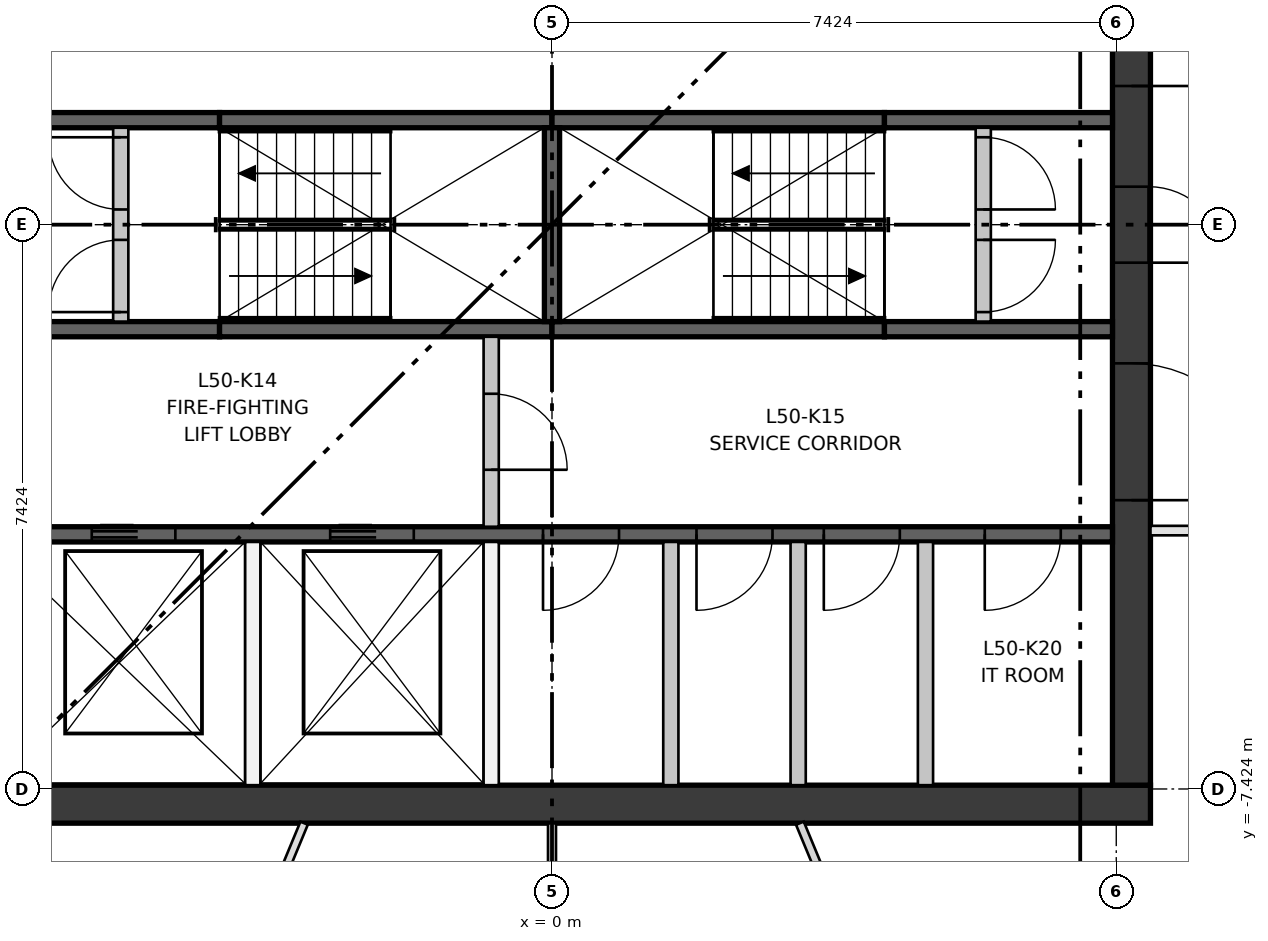
"""IFC4 building model, lengths in metres.
Left out: names, types, materials, properties, quantities, classifications, styles, units other than length and angle.
Written with IfcOpenShell. Run it as: python <this file> out.ifc"""

import sys

from ifc_helpers import new_model, si_unit, direction, frame, frame_2d, origin, place, context, subcontext, project, spatial, rectangle, extrude, element, fill, save


model = new_model("IFC4")
c1 = context("Model", 3, precision=1e-05, world=origin(), true_north=direction((0.0, 1.0)))
c2 = subcontext(c1, "Body", "Model", "MODEL_VIEW")
j1 = project(units=[si_unit("LENGTHUNIT", "METRE"), si_unit("PLANEANGLEUNIT", "RADIAN")], contexts=[c1])
p1 = place(None, origin())
s1 = spatial("IfcSite", under=j1, at=p1, CompositionType="ELEMENT")
p2 = place(p1, origin())
s2 = spatial("IfcBuilding", under=s1, at=p2, CompositionType="ELEMENT")
p3 = place(p2, frame((0.0, 0.0, 187.65)))
s3 = spatial("IfcBuildingStorey", under=s2, at=p3, CompositionType="ELEMENT", Elevation=187.65)
p4 = place(p3, frame((-7.874, -7.624, 0.0), z_axis=(0.0, 0.0, 1.0), x_axis=(1.0, 0.0, 0.0)))
e1 = element("IfcWall", 1, at=p4, inside=s3, PredefinedType="SHEAR", context=c2, shape_type="SweptSolid", body=[
    extrude(rectangle(XDim=15.748, YDim=0.5, at=frame_2d((7.874, 0.0))), origin(), (0.0, 0.0, 1.0), 3.35),
])
p5 = place(p3, frame((7.624, -7.374, 0.0), z_axis=(0.0, 0.0, 1.0), x_axis=(0.0, 1.0, 0.0)))
e2 = element("IfcWall", 2, at=p5, inside=s3, PredefinedType="SHEAR", context=c2, shape_type="SweptSolid", body=[
    extrude(rectangle(XDim=14.748, YDim=0.5, at=frame_2d((7.374, 0.0))), origin(), (0.0, 0.0, 1.0), 3.35),
])
p6 = place(p5, frame((6.874, 0.0, 0.0)))
e3 = element("IfcOpeningElement", 3, at=p6, cuts=e2, PredefinedType="OPENING", context=c2, shape_type="SweptSolid", body=[
    extrude(rectangle(XDim=1.0, YDim=2.1, at=frame_2d((0.5, 1.05))), frame((0.0, 0.26, 0.0), z_axis=(0.0, -1.0, 0.0), x_axis=(1.0, 0.0, 0.0)), (0.0, 0.0, 1.0), 0.52),
])
p7 = place(p5, frame((3.75, 0.0, 0.0)))
e4 = element("IfcOpeningElement", 4, at=p7, cuts=e2, PredefinedType="OPENING", context=c2, shape_type="SweptSolid", body=[
    extrude(rectangle(XDim=1.8, YDim=2.1, at=frame_2d((0.9, 1.05))), frame((0.0, 0.26, 0.0), z_axis=(0.0, -1.0, 0.0), x_axis=(1.0, 0.0, 0.0)), (0.0, 0.0, 1.0), 0.52),
])
p8 = place(p5, frame((9.198, 0.0, 0.0)))
e5 = element("IfcOpeningElement", 5, at=p8, cuts=e2, PredefinedType="OPENING", context=c2, shape_type="SweptSolid", body=[
    extrude(rectangle(XDim=1.8, YDim=2.1, at=frame_2d((0.9, 1.05))), frame((0.0, 0.26, 0.0), z_axis=(0.0, -1.0, 0.0), x_axis=(1.0, 0.0, 0.0)), (0.0, 0.0, 1.0), 0.52),
])
p9 = place(p3, frame((-7.374, -4.074, 0.0), z_axis=(0.0, 0.0, 1.0), x_axis=(1.0, 0.0, 0.0)))
e6 = element("IfcWall", 6, at=p9, inside=s3, PredefinedType="SHEAR", context=c2, shape_type="SweptSolid", body=[
    extrude(rectangle(XDim=14.748, YDim=0.2, at=frame_2d((7.374, 0.0))), origin(), (0.0, 0.0, 1.0), 3.0),
])
p10 = place(p9, frame((1.319, 0.0, 0.0)))
e7 = element("IfcOpeningElement", 7, at=p10, cuts=e6, PredefinedType="OPENING", context=c2, shape_type="SweptSolid", body=[
    extrude(rectangle(XDim=1.1, YDim=2.1, at=frame_2d((0.55, 1.05))), frame((0.0, 0.11, 0.0), z_axis=(0.0, -1.0, 0.0), x_axis=(1.0, 0.0, 0.0)), (0.0, 0.0, 1.0), 0.22),
])
p11 = place(p9, frame((4.456, 0.0, 0.0)))
e8 = element("IfcOpeningElement", 8, at=p11, cuts=e6, PredefinedType="OPENING", context=c2, shape_type="SweptSolid", body=[
    extrude(rectangle(XDim=1.1, YDim=2.1, at=frame_2d((0.55, 1.05))), frame((0.0, 0.11, 0.0), z_axis=(0.0, -1.0, 0.0), x_axis=(1.0, 0.0, 0.0)), (0.0, 0.0, 1.0), 0.22),
])
p12 = place(p9, frame((7.256, 0.0, 0.0)))
e9 = element("IfcOpeningElement", 9, at=p12, cuts=e6, PredefinedType="OPENING", context=c2, shape_type="SweptSolid", body=[
    extrude(rectangle(XDim=1.0, YDim=2.1, at=frame_2d((0.5, 1.05))), frame((0.0, 0.11, 0.0), z_axis=(0.0, -1.0, 0.0), x_axis=(1.0, 0.0, 0.0)), (0.0, 0.0, 1.0), 0.22),
])
p13 = place(p9, frame((9.275, 0.0, 0.0)))
e10 = element("IfcOpeningElement", 10, at=p13, cuts=e6, PredefinedType="OPENING", context=c2, shape_type="SweptSolid", body=[
    extrude(rectangle(XDim=1.0, YDim=2.1, at=frame_2d((0.5, 1.05))), frame((0.0, 0.11, 0.0), z_axis=(0.0, -1.0, 0.0), x_axis=(1.0, 0.0, 0.0)), (0.0, 0.0, 1.0), 0.22),
])
p14 = place(p9, frame((10.95, 0.0, 0.0)))
e11 = element("IfcOpeningElement", 11, at=p14, cuts=e6, PredefinedType="OPENING", context=c2, shape_type="SweptSolid", body=[
    extrude(rectangle(XDim=1.0, YDim=2.1, at=frame_2d((0.5, 1.05))), frame((0.0, 0.11, 0.0), z_axis=(0.0, -1.0, 0.0), x_axis=(1.0, 0.0, 0.0)), (0.0, 0.0, 1.0), 0.22),
])
p15 = place(p9, frame((13.068, 0.0, 0.0)))
e12 = element("IfcOpeningElement", 12, at=p15, cuts=e6, PredefinedType="OPENING", context=c2, shape_type="SweptSolid", body=[
    extrude(rectangle(XDim=1.0, YDim=2.1, at=frame_2d((0.5, 1.05))), frame((0.0, 0.11, 0.0), z_axis=(0.0, -1.0, 0.0), x_axis=(1.0, 0.0, 0.0)), (0.0, 0.0, 1.0), 0.22),
])
p16 = place(p3, frame((-7.374, -1.375, 0.0), z_axis=(0.0, 0.0, 1.0), x_axis=(1.0, 0.0, 0.0)))
e13 = element("IfcWall", 13, at=p16, inside=s3, PredefinedType="SHEAR", context=c2, shape_type="SweptSolid", body=[
    extrude(rectangle(XDim=3.0, YDim=0.2, at=frame_2d((1.5, 0.0))), origin(), (0.0, 0.0, 1.0), 3.0),
])
for number, where, z_axis, x_axis in (
    (14, (-4.374, -1.375, 0.0), (0.0, 0.0, 1.0), (1.0, 0.0, 0.0)),
    (15, (0.0, -1.375, 0.0), (0.0, 0.0, 1.0), (1.0, 0.0, 0.0)),
):
    element("IfcWall", number, at=place(p3, frame(where, z_axis=z_axis, x_axis=x_axis)), inside=s3, PredefinedType="SHEAR", context=c2, shape_type="SweptSolid", body=[
        extrude(rectangle(XDim=4.374, YDim=0.2, at=frame_2d((2.187, 0.0))), origin(), (0.0, 0.0, 1.0), 3.0),
    ])
for number, where, z_axis, x_axis in (
    (16, (4.374, -1.375, 0.0), (0.0, 0.0, 1.0), (1.0, 0.0, 0.0)),
    (17, (-7.374, 1.375, 0.0), (0.0, 0.0, 1.0), (1.0, 0.0, 0.0)),
):
    element("IfcWall", number, at=place(p3, frame(where, z_axis=z_axis, x_axis=x_axis)), inside=s3, PredefinedType="SHEAR", context=c2, shape_type="SweptSolid", body=[
        extrude(rectangle(XDim=3.0, YDim=0.2, at=frame_2d((1.5, 0.0))), origin(), (0.0, 0.0, 1.0), 3.0),
    ])
for number, where, z_axis, x_axis in (
    (18, (-4.374, 1.375, 0.0), (0.0, 0.0, 1.0), (1.0, 0.0, 0.0)),
    (19, (0.0, 1.375, 0.0), (0.0, 0.0, 1.0), (1.0, 0.0, 0.0)),
):
    element("IfcWall", number, at=place(p3, frame(where, z_axis=z_axis, x_axis=x_axis)), inside=s3, PredefinedType="SHEAR", context=c2, shape_type="SweptSolid", body=[
        extrude(rectangle(XDim=4.374, YDim=0.2, at=frame_2d((2.187, 0.0))), origin(), (0.0, 0.0, 1.0), 3.0),
    ])
p17 = place(p3, frame((4.374, 1.375, 0.0), z_axis=(0.0, 0.0, 1.0), x_axis=(1.0, 0.0, 0.0)))
e20 = element("IfcWall", 20, at=p17, inside=s3, PredefinedType="SHEAR", context=c2, shape_type="SweptSolid", body=[
    extrude(rectangle(XDim=3.0, YDim=0.2, at=frame_2d((1.5, 0.0))), origin(), (0.0, 0.0, 1.0), 3.0),
])
p18 = place(p3, frame((0.0, -1.275, 0.0), z_axis=(0.0, 0.0, 1.0), x_axis=(0.0, 1.0, 0.0)))
e21 = element("IfcWall", 21, at=p18, inside=s3, PredefinedType="SHEAR", context=c2, shape_type="SweptSolid", body=[
    extrude(rectangle(XDim=2.55, YDim=0.2, at=frame_2d((1.275, 0.0))), origin(), (0.0, 0.0, 1.0), 3.0),
])
for number, where, z_axis, x_axis in (
    (22, (-3.937, -7.374, 0.0), (0.0, 0.0, 1.0), (0.0, 1.0, 0.0)),
    (23, (-0.8, -7.374, 0.0), (0.0, 0.0, 1.0), (0.0, 1.0, 0.0)),
):
    element("IfcWall", number, at=place(p3, frame(where, z_axis=z_axis, x_axis=x_axis)), inside=s3, PredefinedType="PARTITIONING", context=c2, shape_type="SweptSolid", body=[
        extrude(rectangle(XDim=3.2, YDim=0.2, at=frame_2d((1.6, 0.0))), origin(), (0.0, 0.0, 1.0), 3.0),
    ])
p19 = place(p3, frame((-0.8, -3.974, 0.0), z_axis=(0.0, 0.0, 1.0), x_axis=(0.0, 1.0, 0.0)))
e24 = element("IfcWall", 24, at=p19, inside=s3, PredefinedType="PARTITIONING", context=c2, shape_type="SweptSolid", body=[
    extrude(rectangle(XDim=2.499, YDim=0.2, at=frame_2d((1.25, 0.0))), origin(), (0.0, 0.0, 1.0), 3.0),
])
p20 = place(p19, frame((0.75, 0.0, 0.0)))
e25 = element("IfcOpeningElement", 25, at=p20, cuts=e24, PredefinedType="OPENING", context=c2, shape_type="SweptSolid", body=[
    extrude(rectangle(XDim=1.0, YDim=2.1, at=frame_2d((0.5, 1.05))), frame((0.0, 0.11, 0.0), z_axis=(0.0, -1.0, 0.0), x_axis=(1.0, 0.0, 0.0)), (0.0, 0.0, 1.0), 0.22),
])
for number, where, z_axis, x_axis in (
    (26, (1.563, -7.374, 0.0), (0.0, 0.0, 1.0), (0.0, 1.0, 0.0)),
    (27, (3.239, -7.374, 0.0), (0.0, 0.0, 1.0), (0.0, 1.0, 0.0)),
    (28, (4.914, -7.374, 0.0), (0.0, 0.0, 1.0), (0.0, 1.0, 0.0)),
):
    element("IfcWall", number, at=place(p3, frame(where, z_axis=z_axis, x_axis=x_axis)), inside=s3, PredefinedType="PARTITIONING", context=c2, shape_type="SweptSolid", body=[
        extrude(rectangle(XDim=3.2, YDim=0.2, at=frame_2d((1.6, 0.0))), origin(), (0.0, 0.0, 1.0), 3.0),
    ])
p21 = place(p3, frame((-5.674, -1.275, 0.0), z_axis=(0.0, 0.0, 1.0), x_axis=(0.0, 1.0, 0.0)))
e29 = element("IfcWall", 29, at=p21, inside=s3, PredefinedType="PARTITIONING", context=c2, shape_type="SweptSolid", body=[
    extrude(rectangle(XDim=2.55, YDim=0.2, at=frame_2d((1.275, 0.0))), origin(), (0.0, 0.0, 1.0), 3.0),
])
p22 = place(p21, frame((0.125, 0.0, 0.0)))
e30 = element("IfcOpeningElement", 30, at=p22, cuts=e29, PredefinedType="OPENING", context=c2, shape_type="SweptSolid", body=[
    extrude(rectangle(XDim=0.95, YDim=2.1, at=frame_2d((0.475, 1.05))), frame((0.0, 0.11, 0.0), z_axis=(0.0, -1.0, 0.0), x_axis=(1.0, 0.0, 0.0)), (0.0, 0.0, 1.0), 0.22),
])
p23 = place(p21, frame((1.475, 0.0, 0.0)))
e31 = element("IfcOpeningElement", 31, at=p23, cuts=e29, PredefinedType="OPENING", context=c2, shape_type="SweptSolid", body=[
    extrude(rectangle(XDim=0.95, YDim=2.1, at=frame_2d((0.475, 1.05))), frame((0.0, 0.11, 0.0), z_axis=(0.0, -1.0, 0.0), x_axis=(1.0, 0.0, 0.0)), (0.0, 0.0, 1.0), 0.22),
])
p24 = place(p3, frame((5.674, -1.275, 0.0), z_axis=(0.0, 0.0, 1.0), x_axis=(0.0, 1.0, 0.0)))
e32 = element("IfcWall", 32, at=p24, inside=s3, PredefinedType="PARTITIONING", context=c2, shape_type="SweptSolid", body=[
    extrude(rectangle(XDim=2.55, YDim=0.2, at=frame_2d((1.275, 0.0))), origin(), (0.0, 0.0, 1.0), 3.0),
])
p25 = place(p24, frame((0.125, 0.0, 0.0)))
e33 = element("IfcOpeningElement", 33, at=p25, cuts=e32, PredefinedType="OPENING", context=c2, shape_type="SweptSolid", body=[
    extrude(rectangle(XDim=0.95, YDim=2.1, at=frame_2d((0.475, 1.05))), frame((0.0, 0.11, 0.0), z_axis=(0.0, -1.0, 0.0), x_axis=(1.0, 0.0, 0.0)), (0.0, 0.0, 1.0), 0.22),
])
p26 = place(p24, frame((1.475, 0.0, 0.0)))
e34 = element("IfcOpeningElement", 34, at=p26, cuts=e32, PredefinedType="OPENING", context=c2, shape_type="SweptSolid", body=[
    extrude(rectangle(XDim=0.95, YDim=2.1, at=frame_2d((0.475, 1.05))), frame((0.0, 0.11, 0.0), z_axis=(0.0, -1.0, 0.0), x_axis=(1.0, 0.0, 0.0)), (0.0, 0.0, 1.0), 0.22),
])
p27 = place(p3, frame((11.824, -4.024, 0.0), z_axis=(0.0, 0.0, 1.0), x_axis=(-1.0, 0.0, 0.0)))
e35 = element("IfcWall", 35, at=p27, inside=s3, PredefinedType="PARTITIONING", context=c2, shape_type="SweptSolid", body=[
    extrude(rectangle(XDim=3.95, YDim=0.125, at=frame_2d((1.975, 0.0))), origin(), (0.0, 0.0, 1.0), 3.0),
])
p28 = place(p27, frame((1.1, 0.0, 0.0)))
e36 = element("IfcOpeningElement", 36, at=p28, cuts=e35, PredefinedType="OPENING", context=c2, shape_type="SweptSolid", body=[
    extrude(rectangle(XDim=1.8, YDim=2.1, at=frame_2d((0.9, 1.05))), frame((0.0, 0.073, 0.0), z_axis=(0.0, -1.0, 0.0), x_axis=(1.0, 0.0, 0.0)), (0.0, 0.0, 1.0), 0.145),
])
p29 = place(p3, frame((-3.261, -7.874, 0.0), z_axis=(0.0, 0.0, 1.0), x_axis=(-0.382666229821, -0.923886657851, 0.0)))
e37 = element("IfcWall", 37, at=p29, inside=s3, PredefinedType="PARTITIONING", context=c2, shape_type="SweptSolid", body=[
    extrude(rectangle(XDim=3.977, YDim=0.105, at=frame_2d((1.989, 0.0))), origin(), (0.0, 0.0, 1.0), 3.0),
])
p30 = place(p29, frame((1.5, 0.0, 0.0)))
e38 = element("IfcOpeningElement", 38, at=p30, cuts=e37, PredefinedType="OPENING", context=c2, shape_type="SweptSolid", body=[
    extrude(rectangle(XDim=1.0, YDim=2.1, at=frame_2d((0.5, 1.05))), frame((0.0, 0.062, 0.0), z_axis=(0.0, -1.0, 0.0), x_axis=(1.0, 0.0, 0.0)), (0.0, 0.0, 1.0), 0.125),
])
p31 = place(p3, frame((0.0, -7.874, 0.0), z_axis=(0.0, 0.0, 1.0), x_axis=(0.0, -1.0, 0.0)))
e39 = element("IfcWall", 39, at=p31, inside=s3, PredefinedType="PARTITIONING", context=c2, shape_type="SweptSolid", body=[
    extrude(rectangle(XDim=4.57, YDim=0.105, at=frame_2d((2.285, 0.0))), origin(), (0.0, 0.0, 1.0), 3.0),
])
p32 = place(p3, frame((3.261, -7.874, 0.0), z_axis=(0.0, 0.0, 1.0), x_axis=(0.382666229821, -0.923886657851, 0.0)))
e40 = element("IfcWall", 40, at=p32, inside=s3, PredefinedType="PARTITIONING", context=c2, shape_type="SweptSolid", body=[
    extrude(rectangle(XDim=3.977, YDim=0.11, at=frame_2d((1.989, 0.0))), origin(), (0.0, 0.0, 1.0), 3.0),
])
p33 = place(p10, origin())
e41 = element("IfcDoor", 41, at=p33, inside=s3, OperationType="DOUBLE_DOOR_SLIDING", PredefinedType="DOOR", context=c2, shape_type="SweptSolid", body=[
    extrude(rectangle(XDim=1.1, YDim=2.1, at=frame_2d((0.55, 1.05))), frame((0.0, 0.025, 0.0), z_axis=(0.0, -1.0, 0.0), x_axis=(1.0, 0.0, 0.0)), (0.0, 0.0, 1.0), 0.05),
])
fill(e7, e41)
p34 = place(p11, origin())
e42 = element("IfcDoor", 42, at=p34, inside=s3, OperationType="DOUBLE_DOOR_SLIDING", PredefinedType="DOOR", context=c2, shape_type="SweptSolid", body=[
    extrude(rectangle(XDim=1.1, YDim=2.1, at=frame_2d((0.55, 1.05))), frame((0.0, 0.025, 0.0), z_axis=(0.0, -1.0, 0.0), x_axis=(1.0, 0.0, 0.0)), (0.0, 0.0, 1.0), 0.05),
])
fill(e8, e42)
p35 = place(p22, origin())
e43 = element("IfcDoor", 43, at=p35, inside=s3, OperationType="SINGLE_SWING_LEFT", PredefinedType="DOOR", context=c2, shape_type="SweptSolid", body=[
    extrude(rectangle(XDim=0.95, YDim=2.1, at=frame_2d((0.475, 1.05))), frame((0.0, 0.025, 0.0), z_axis=(0.0, -1.0, 0.0), x_axis=(1.0, 0.0, 0.0)), (0.0, 0.0, 1.0), 0.05),
])
fill(e30, e43)
p36 = place(p23, origin())
e44 = element("IfcDoor", 44, at=p36, inside=s3, OperationType="SINGLE_SWING_RIGHT", PredefinedType="DOOR", context=c2, shape_type="SweptSolid", body=[
    extrude(rectangle(XDim=0.95, YDim=2.1, at=frame_2d((0.475, 1.05))), frame((0.0, 0.025, 0.0), z_axis=(0.0, -1.0, 0.0), x_axis=(1.0, 0.0, 0.0)), (0.0, 0.0, 1.0), 0.05),
])
fill(e31, e44)
p37 = place(p25, frame((0.95, 0.0, 0.0), z_axis=(0.0, 0.0, 1.0), x_axis=(-1.0, 0.0, 0.0)))
e45 = element("IfcDoor", 45, at=p37, inside=s3, OperationType="SINGLE_SWING_RIGHT", PredefinedType="DOOR", context=c2, shape_type="SweptSolid", body=[
    extrude(rectangle(XDim=0.95, YDim=2.1, at=frame_2d((0.475, 1.05))), frame((0.0, 0.025, 0.0), z_axis=(0.0, -1.0, 0.0), x_axis=(1.0, 0.0, 0.0)), (0.0, 0.0, 1.0), 0.05),
])
fill(e33, e45)
p38 = place(p26, frame((0.95, 0.0, 0.0), z_axis=(0.0, 0.0, 1.0), x_axis=(-1.0, 0.0, 0.0)))
e46 = element("IfcDoor", 46, at=p38, inside=s3, OperationType="SINGLE_SWING_LEFT", PredefinedType="DOOR", context=c2, shape_type="SweptSolid", body=[
    extrude(rectangle(XDim=0.95, YDim=2.1, at=frame_2d((0.475, 1.05))), frame((0.0, 0.025, 0.0), z_axis=(0.0, -1.0, 0.0), x_axis=(1.0, 0.0, 0.0)), (0.0, 0.0, 1.0), 0.05),
])
fill(e34, e46)
p39 = place(p20, frame((1.0, 0.0, 0.0), z_axis=(0.0, 0.0, 1.0), x_axis=(-1.0, 0.0, 0.0)))
e47 = element("IfcDoor", 47, at=p39, inside=s3, OperationType="SINGLE_SWING_LEFT", PredefinedType="DOOR", context=c2, shape_type="SweptSolid", body=[
    extrude(rectangle(XDim=1.0, YDim=2.1, at=frame_2d((0.5, 1.05))), frame((0.0, 0.025, 0.0), z_axis=(0.0, -1.0, 0.0), x_axis=(1.0, 0.0, 0.0)), (0.0, 0.0, 1.0), 0.05),
])
fill(e25, e47)
p40 = place(p12, frame((1.0, 0.0, 0.0), z_axis=(0.0, 0.0, 1.0), x_axis=(-1.0, 0.0, 0.0)))
e48 = element("IfcDoor", 48, at=p40, inside=s3, OperationType="SINGLE_SWING_LEFT", PredefinedType="DOOR", context=c2, shape_type="SweptSolid", body=[
    extrude(rectangle(XDim=1.0, YDim=2.1, at=frame_2d((0.5, 1.05))), frame((0.0, 0.025, 0.0), z_axis=(0.0, -1.0, 0.0), x_axis=(1.0, 0.0, 0.0)), (0.0, 0.0, 1.0), 0.05),
])
fill(e9, e48)
p41 = place(p13, frame((1.0, 0.0, 0.0), z_axis=(0.0, 0.0, 1.0), x_axis=(-1.0, 0.0, 0.0)))
e49 = element("IfcDoor", 49, at=p41, inside=s3, OperationType="SINGLE_SWING_LEFT", PredefinedType="DOOR", context=c2, shape_type="SweptSolid", body=[
    extrude(rectangle(XDim=1.0, YDim=2.1, at=frame_2d((0.5, 1.05))), frame((0.0, 0.025, 0.0), z_axis=(0.0, -1.0, 0.0), x_axis=(1.0, 0.0, 0.0)), (0.0, 0.0, 1.0), 0.05),
])
fill(e10, e49)
p42 = place(p14, frame((1.0, 0.0, 0.0), z_axis=(0.0, 0.0, 1.0), x_axis=(-1.0, 0.0, 0.0)))
e50 = element("IfcDoor", 50, at=p42, inside=s3, OperationType="SINGLE_SWING_LEFT", PredefinedType="DOOR", context=c2, shape_type="SweptSolid", body=[
    extrude(rectangle(XDim=1.0, YDim=2.1, at=frame_2d((0.5, 1.05))), frame((0.0, 0.025, 0.0), z_axis=(0.0, -1.0, 0.0), x_axis=(1.0, 0.0, 0.0)), (0.0, 0.0, 1.0), 0.05),
])
fill(e11, e50)
p43 = place(p15, frame((1.0, 0.0, 0.0), z_axis=(0.0, 0.0, 1.0), x_axis=(-1.0, 0.0, 0.0)))
e51 = element("IfcDoor", 51, at=p43, inside=s3, OperationType="SINGLE_SWING_LEFT", PredefinedType="DOOR", context=c2, shape_type="SweptSolid", body=[
    extrude(rectangle(XDim=1.0, YDim=2.1, at=frame_2d((0.5, 1.05))), frame((0.0, 0.025, 0.0), z_axis=(0.0, -1.0, 0.0), x_axis=(1.0, 0.0, 0.0)), (0.0, 0.0, 1.0), 0.05),
])
fill(e12, e51)
p44 = place(p6, frame((1.0, 0.0, 0.0), z_axis=(0.0, 0.0, 1.0), x_axis=(-1.0, 0.0, 0.0)))
e52 = element("IfcDoor", 52, at=p44, inside=s3, OperationType="SINGLE_SWING_LEFT", PredefinedType="DOOR", context=c2, shape_type="SweptSolid", body=[
    extrude(rectangle(XDim=1.0, YDim=2.1, at=frame_2d((0.5, 1.05))), frame((0.0, 0.25, 0.0), z_axis=(0.0, -1.0, 0.0), x_axis=(1.0, 0.0, 0.0)), (0.0, 0.0, 1.0), 0.05),
])
fill(e3, e52)
p45 = place(p7, frame((1.8, 0.0, 0.0), z_axis=(0.0, 0.0, 1.0), x_axis=(-1.0, 0.0, 0.0)))
e53 = element("IfcDoor", 53, at=p45, inside=s3, OperationType="DOUBLE_DOOR_SINGLE_SWING", PredefinedType="DOOR", context=c2, shape_type="SweptSolid", body=[
    extrude(rectangle(XDim=1.8, YDim=2.1, at=frame_2d((0.9, 1.05))), frame((0.0, 0.025, 0.0), z_axis=(0.0, -1.0, 0.0), x_axis=(1.0, 0.0, 0.0)), (0.0, 0.0, 1.0), 0.05),
])
fill(e4, e53)
p46 = place(p8, frame((1.8, 0.0, 0.0), z_axis=(0.0, 0.0, 1.0), x_axis=(-1.0, 0.0, 0.0)))
e54 = element("IfcDoor", 54, at=p46, inside=s3, OperationType="DOUBLE_DOOR_SINGLE_SWING", PredefinedType="DOOR", context=c2, shape_type="SweptSolid", body=[
    extrude(rectangle(XDim=1.8, YDim=2.1, at=frame_2d((0.9, 1.05))), frame((0.0, 0.025, 0.0), z_axis=(0.0, -1.0, 0.0), x_axis=(1.0, 0.0, 0.0)), (0.0, 0.0, 1.0), 0.05),
])
fill(e5, e54)
save(model, sys.argv[1])
